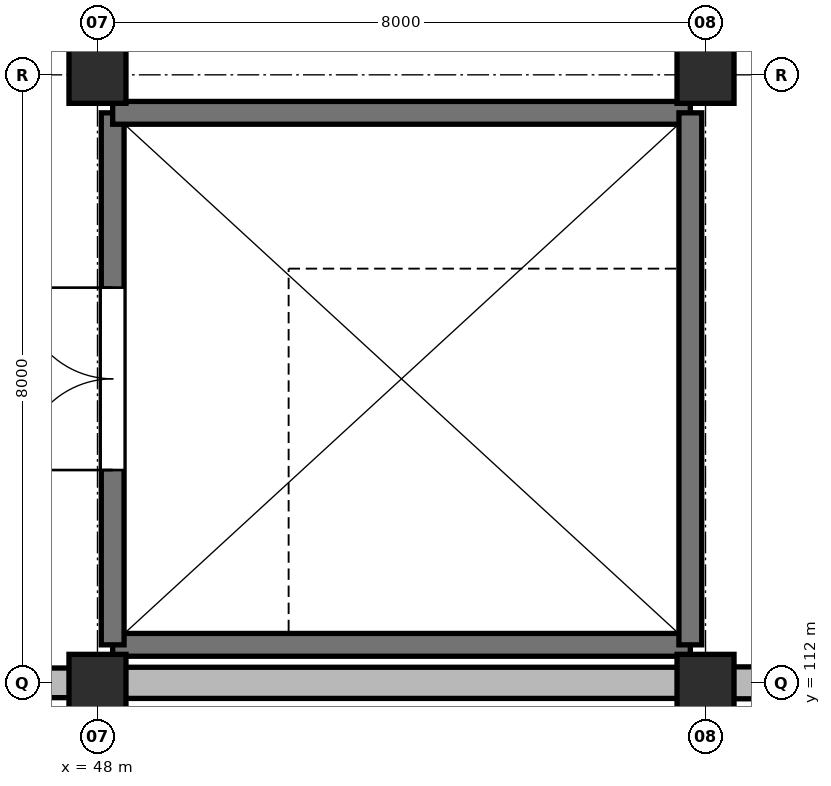
"""IFC4 building model, lengths in metres.
Left out: names, types, materials, properties, quantities, classifications, styles, units other than length and angle.
Written with IfcOpenShell. Run it as: python <this file> out.ifc"""

import sys

from ifc_helpers import new_model, si_unit, direction, frame, frame_2d, origin, origin_2d, place, context, subcontext, project, spatial, rectangle, extrude, element, fill, save


model = new_model("IFC4")
c1 = context("Model", 3, precision=1e-05, world=origin(), true_north=direction((0.0, 1.0)))
c2 = subcontext(c1, "Body", "Model", "MODEL_VIEW")
j1 = project(units=[si_unit("LENGTHUNIT", "METRE"), si_unit("PLANEANGLEUNIT", "RADIAN")], contexts=[c1])
p1 = place(None, origin())
s1 = spatial("IfcSite", under=j1, at=p1, CompositionType="ELEMENT")
p2 = place(p1, origin())
s2 = spatial("IfcBuilding", under=s1, at=p2, CompositionType="ELEMENT")
p3 = place(p2, frame((0.0, 0.0, 5.4)))
s3 = spatial("IfcBuildingStorey", under=s2, at=p3, CompositionType="ELEMENT", Elevation=5.4)
for number, where, z_axis, x_axis in (
    (1, (48.0, 112.0, 0.0), (0.0, 0.0, 1.0), (1.0, 0.0, 0.0)),
    (2, (48.0, 120.0, 0.0), (0.0, 0.0, 1.0), (1.0, 0.0, 0.0)),
    (3, (56.0, 112.0, 0.0), (0.0, 0.0, 1.0), (1.0, 0.0, 0.0)),
    (4, (56.0, 120.0, 0.0), (0.0, 0.0, 1.0), (1.0, 0.0, 0.0)),
):
    element("IfcColumn", number, at=place(p3, frame(where, z_axis=z_axis, x_axis=x_axis)), inside=s3, PredefinedType="COLUMN", context=c2, shape_type="SweptSolid", body=[
        extrude(rectangle(XDim=0.75, YDim=0.75, at=origin_2d()), origin(), (0.0, 0.0, 1.0), 4.8),
    ])
p4 = place(p3, frame((47.645, 112.0, 0.0), z_axis=(0.0, 0.0, 1.0), x_axis=(-1.0, 0.0, 0.0)))
e5 = element("IfcWall", 5, at=p4, inside=s3, PredefinedType="SOLIDWALL", context=c2, shape_type="SweptSolid", body=[
    extrude(rectangle(XDim=7.29, YDim=0.39, at=frame_2d((3.645, 0.0))), origin(), (0.0, 0.0, 1.0), 3.45),
])
p5 = place(p3, frame((55.645, 112.0, 0.0), z_axis=(0.0, 0.0, 1.0), x_axis=(-1.0, 0.0, 0.0)))
e6 = element("IfcWall", 6, at=p5, inside=s3, PredefinedType="SOLIDWALL", context=c2, shape_type="SweptSolid", body=[
    extrude(rectangle(XDim=7.29, YDim=0.41, at=frame_2d((3.645, 0.0))), origin(), (0.0, 0.0, 1.0), 3.6),
])
p6 = place(p3, frame((63.42, 112.0, 0.0), z_axis=(0.0, 0.0, 1.0), x_axis=(-1.0, 0.0, 0.0)))
e7 = element("IfcWall", 7, at=p6, inside=s3, PredefinedType="SOLIDWALL", context=c2, shape_type="SweptSolid", body=[
    extrude(rectangle(XDim=7.065, YDim=0.42, at=frame_2d((3.532, 0.0))), origin(), (0.0, 0.0, 1.0), 3.45),
])
p7 = place(p3, frame((55.8, 112.5, 0.0), z_axis=(0.0, 0.0, 1.0), x_axis=(-1.0, 0.0, 0.0)))
e8 = element("IfcWall", 8, at=p7, inside=s3, PredefinedType="SHEAR", context=c2, shape_type="SweptSolid", body=[
    extrude(rectangle(XDim=7.6, YDim=0.3, at=frame_2d((3.8, 0.0))), origin(), (0.0, 0.0, 1.0), 4.48),
])
p8 = place(p3, frame((48.2, 112.5, 0.0), z_axis=(0.0, 0.0, 1.0), x_axis=(0.0, 1.0, 0.0)))
e9 = element("IfcWall", 9, at=p8, inside=s3, PredefinedType="SHEAR", context=c2, shape_type="SweptSolid", body=[
    extrude(rectangle(XDim=7.0, YDim=0.3, at=frame_2d((3.5, 0.0))), origin(), (0.0, 0.0, 1.0), 4.48),
])
p9 = place(p8, frame((2.3, 0.0, 0.0)))
e10 = element("IfcOpeningElement", 10, at=p9, cuts=e9, PredefinedType="OPENING", context=c2, shape_type="SweptSolid", body=[
    extrude(rectangle(XDim=2.4, YDim=2.2, at=frame_2d((1.2, 1.1))), frame((0.0, 0.16, 0.0), z_axis=(0.0, -1.0, 0.0), x_axis=(1.0, 0.0, 0.0)), (0.0, 0.0, 1.0), 0.32),
])
p10 = place(p3, frame((48.2, 119.5, 0.0), z_axis=(0.0, 0.0, 1.0), x_axis=(1.0, 0.0, 0.0)))
e11 = element("IfcWall", 11, at=p10, inside=s3, PredefinedType="SHEAR", context=c2, shape_type="SweptSolid", body=[
    extrude(rectangle(XDim=7.6, YDim=0.3, at=frame_2d((3.8, 0.0))), origin(), (0.0, 0.0, 1.0), 4.48),
])
p11 = place(p3, frame((55.8, 119.5, 0.0), z_axis=(0.0, 0.0, 1.0), x_axis=(0.0, -1.0, 0.0)))
e12 = element("IfcWall", 12, at=p11, inside=s3, PredefinedType="SHEAR", context=c2, shape_type="SweptSolid", body=[
    extrude(rectangle(XDim=7.0, YDim=0.3, at=frame_2d((3.5, 0.0))), origin(), (0.0, 0.0, 1.0), 4.48),
])
p12 = place(p9, frame((2.4, 0.0, 0.0), z_axis=(0.0, 0.0, 1.0), x_axis=(-1.0, 0.0, 0.0)))
e13 = element("IfcDoor", 13, at=p12, inside=s3, OperationType="DOUBLE_DOOR_SINGLE_SWING", PredefinedType="DOOR", context=c2, shape_type="SweptSolid", body=[
    extrude(rectangle(XDim=2.4, YDim=2.2, at=frame_2d((1.2, 1.1))), frame((0.0, 0.025, 0.0), z_axis=(0.0, -1.0, 0.0), x_axis=(1.0, 0.0, 0.0)), (0.0, 0.0, 1.0), 0.05),
])
fill(e10, e13)
save(model, sys.argv[1])
